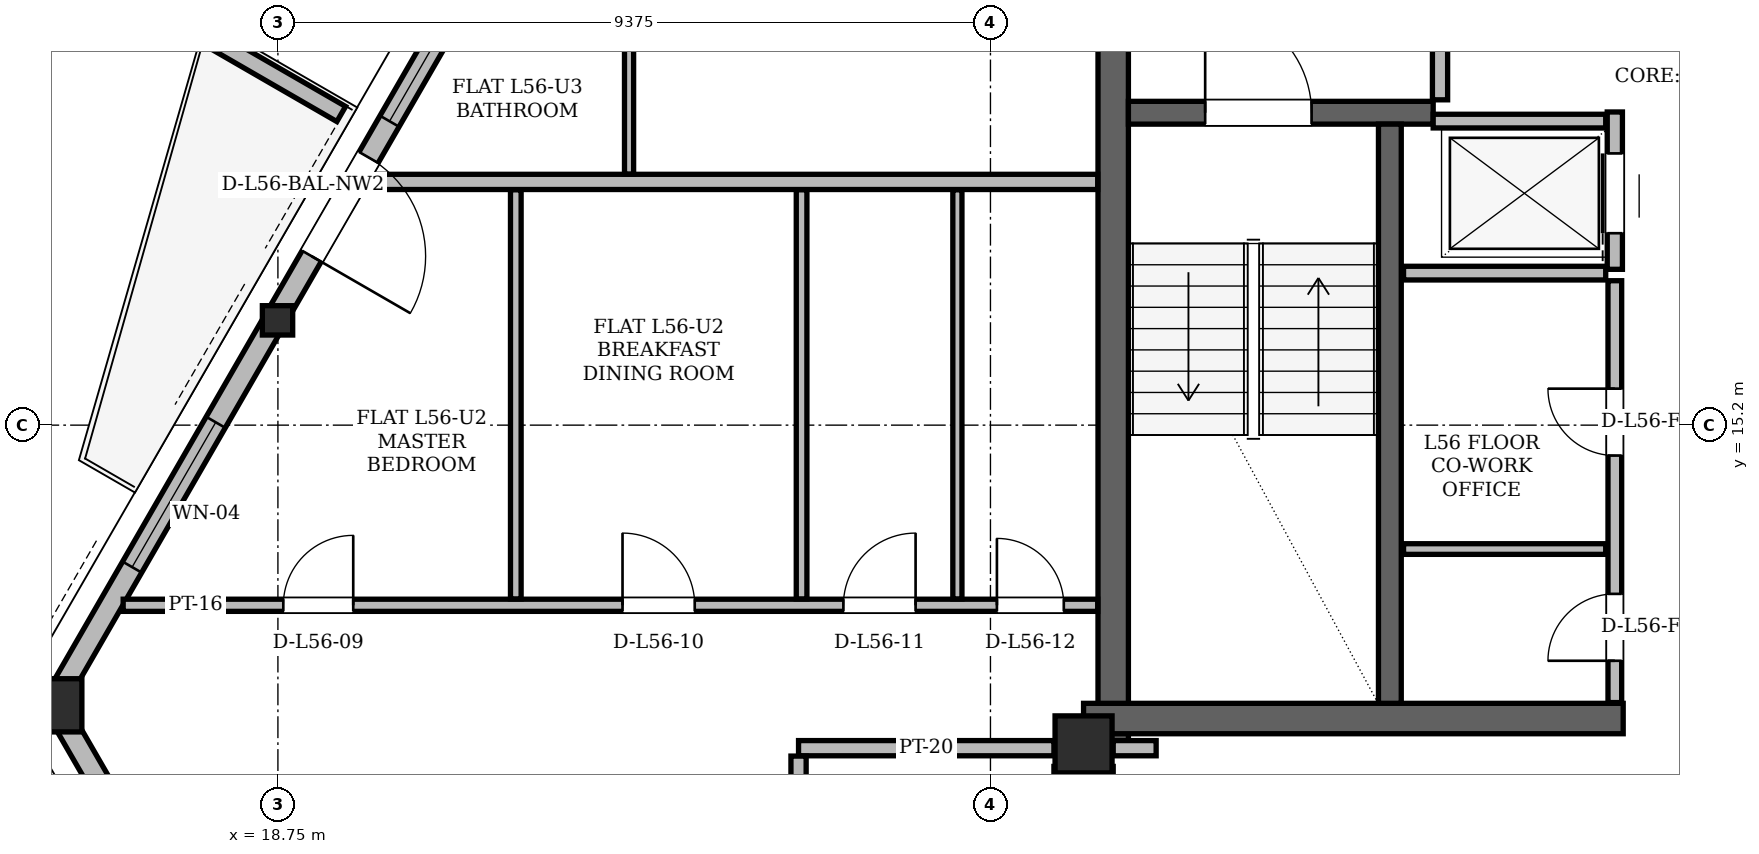
"""IFC4 building model, lengths in metres.
Left out: names, types, materials, properties, quantities, classifications, styles, units other than length and angle.
Written with IfcOpenShell. Run it as: python <this file> out.ifc"""

import sys

from ifc_helpers import new_model, si_unit, direction, frame, frame_2d, origin, origin_2d, place, context, subcontext, project, spatial, polyline, rectangle, hollow_rectangle, i_section, outline, extrude, element, fill, save


model = new_model("IFC4")
c1 = context("Model", 3, precision=1e-05, world=origin(), true_north=direction((0.0, 1.0)))
c2 = subcontext(c1, "Body", "Model", "MODEL_VIEW")
j1 = project(units=[si_unit("LENGTHUNIT", "METRE"), si_unit("PLANEANGLEUNIT", "RADIAN")], contexts=[c1])
p1 = place(None, origin())
s1 = spatial("IfcSite", under=j1, at=p1, CompositionType="ELEMENT")
p2 = place(p1, origin())
s2 = spatial("IfcBuilding", under=s1, at=p2, CompositionType="ELEMENT")
p3 = place(p2, frame((0.0, 0.0, 212.7)))
s3 = spatial("IfcBuildingStorey", under=s2, at=p3, CompositionType="ELEMENT", Elevation=212.7)
p4 = place(p3, frame((29.35, 11.0, 0.0), z_axis=(0.0, 0.0, 1.0), x_axis=(1.0, 0.0, 0.0)))
e1 = element("IfcColumn", 1, at=p4, inside=s3, PredefinedType="COLUMN", context=c2, shape_type="SweptSolid", body=[
    extrude(hollow_rectangle(XDim=0.75, YDim=0.75, WallThickness=0.06, at=origin_2d()), origin(), (0.0, 0.0, 1.0), 3.6),
])
p5 = place(p3, frame((15.799, 11.543, 0.005), z_axis=(0.012235746513, -0.016042423206, 0.999796442865), x_axis=(0.795122252878, 0.606449175924, 0.0)))
e2 = element("IfcColumn", 2, at=p5, inside=s3, PredefinedType="COLUMN", context=c2, shape_type="SweptSolid", body=[
    extrude(hollow_rectangle(XDim=0.7, YDim=0.7, WallThickness=0.055, at=origin_2d()), origin(), (0.0, 0.0, 1.0), 3.592),
])
p6 = place(p3, frame((18.721, 16.604, 0.005), z_axis=(0.013459547427, -0.013867412501, 0.999813250289), x_axis=(0.717580691628, 0.696475377169, 0.0)))
e3 = element("IfcColumn", 3, at=p6, inside=s3, PredefinedType="COLUMN", context=c2, shape_type="SweptSolid", body=[
    extrude(i_section(OverallWidth=0.399, OverallDepth=0.386, WebThickness=0.021, FlangeThickness=0.033, at=origin_2d()), origin(), (0.0, 0.0, 1.0), 3.592),
])
p7 = place(p3, frame((29.74, 11.0, 0.0), z_axis=(0.0, 0.0, 1.0), x_axis=(0.0, 1.0, 0.0)))
e4 = element("IfcWall", 4, at=p7, inside=s3, PredefinedType="SHEAR", context=c2, shape_type="SweptSolid", body=[
    extrude(rectangle(XDim=13.3, YDim=0.4, at=frame_2d((6.65, 0.0))), origin(), (0.0, 0.0, 1.0), 3.38),
])
p8 = place(p3, frame((29.35, 11.34, 0.0), z_axis=(0.0, 0.0, 1.0), x_axis=(1.0, 0.0, 0.0)))
e5 = element("IfcWall", 5, at=p8, inside=s3, PredefinedType="SHEAR", context=c2, shape_type="SweptSolid", body=[
    extrude(rectangle(XDim=7.1, YDim=0.4, at=frame_2d((3.55, 0.0))), origin(), (0.0, 0.0, 1.0), 3.38),
])
p9 = place(p3, frame((29.94, 19.31, 0.0), z_axis=(0.0, 0.0, 1.0), x_axis=(1.0, 0.0, 0.0)))
e6 = element("IfcWall", 6, at=p9, inside=s3, PredefinedType="SHEAR", context=c2, shape_type="SweptSolid", body=[
    extrude(rectangle(XDim=4.01, YDim=0.3, at=frame_2d((2.005, 0.0))), origin(), (0.0, 0.0, 1.0), 3.38),
])
p10 = place(p9, frame((1.01, 0.0, 0.0)))
e7 = element("IfcOpeningElement", 7, at=p10, cuts=e6, PredefinedType="OPENING", context=c2, shape_type="SweptSolid", body=[
    extrude(rectangle(XDim=1.4, YDim=2.2, at=frame_2d((0.7, 1.1))), frame((0.0, 0.15, 0.0), z_axis=(0.0, -1.0, 0.0), x_axis=(1.0, 0.0, 0.0)), (0.0, 0.0, 1.0), 0.3),
])
p11 = place(p3, frame((33.38, 11.54, 0.0), z_axis=(0.0, 0.0, 1.0), x_axis=(0.0, 1.0, 0.0)))
e8 = element("IfcWall", 8, at=p11, inside=s3, PredefinedType="SHEAR", context=c2, shape_type="SweptSolid", body=[
    extrude(rectangle(XDim=7.62, YDim=0.3, at=frame_2d((3.81, 0.0))), origin(), (0.0, 0.0, 1.0), 3.38),
])
p12 = place(p3, frame((15.799, 11.543, 0.0), z_axis=(0.0, 0.0, 1.0), x_axis=(0.499982540895, -0.866035483569, 0.0)))
e9 = element("IfcWall", 9, at=p12, inside=s3, PredefinedType="SOLIDWALL", context=c2, shape_type="SweptSolid", body=[
    extrude(rectangle(XDim=6.88, YDim=0.29, at=frame_2d((3.44, 0.0))), origin(), (0.0, 0.0, 1.0), 2.677),
])
p13 = place(p3, frame((34.06, 43.173, 0.0), z_axis=(0.0, 0.0, 1.0), x_axis=(-0.499999040053, -0.866025958009, 0.0)))
e10 = element("IfcWall", 10, at=p13, inside=s3, PredefinedType="SOLIDWALL", context=c2, shape_type="SweptSolid", body=[
    extrude(rectangle(XDim=36.523, YDim=0.29, at=frame_2d((18.261, 0.0))), origin(), (0.0, 0.0, 1.0), 2.677),
])
p14 = place(p13, frame((8.034, 0.0, 0.0)))
e11 = element("IfcOpeningElement", 11, at=p14, cuts=e10, PredefinedType="OPENING", context=c2, shape_type="SweptSolid", body=[
    extrude(rectangle(XDim=1.5, YDim=2.2, at=frame_2d((0.75, 1.1))), frame((0.0, 0.145, 0.0), z_axis=(0.0, -1.0, 0.0), x_axis=(1.0, 0.0, 0.0)), (0.0, 0.0, 1.0), 0.29),
])
p15 = place(p13, frame((28.233, 0.0, 0.0)))
e12 = element("IfcOpeningElement", 12, at=p15, cuts=e10, PredefinedType="OPENING", context=c2, shape_type="SweptSolid", body=[
    extrude(rectangle(XDim=1.5, YDim=2.2, at=frame_2d((0.75, 1.1))), frame((0.0, 0.145, 0.0), z_axis=(0.0, -1.0, 0.0), x_axis=(1.0, 0.0, 0.0)), (0.0, 0.0, 1.0), 0.29),
])
p16 = place(p13, frame((32.257, 0.0, 0.85)))
e13 = element("IfcOpeningElement", 13, at=p16, cuts=e10, PredefinedType="OPENING", context=c2, shape_type="SweptSolid", body=[
    extrude(rectangle(XDim=2.2, YDim=1.717, at=frame_2d((1.1, 0.858))), frame((0.0, 0.145, 0.0), z_axis=(0.0, -1.0, 0.0), x_axis=(1.0, 0.0, 0.0)), (0.0, 0.0, 1.0), 0.29),
])
p17 = place(p13, frame((22.716, 0.0, 0.85)))
e14 = element("IfcOpeningElement", 14, at=p17, cuts=e10, PredefinedType="OPENING", context=c2, shape_type="SweptSolid", body=[
    extrude(rectangle(XDim=1.2, YDim=1.48, at=frame_2d((0.6, 0.74))), frame((0.0, 0.145, 0.0), z_axis=(0.0, -1.0, 0.0), x_axis=(1.0, 0.0, 0.0)), (0.0, 0.0, 1.0), 0.29),
])
p18 = place(p13, frame((26.483, 0.0, 0.85)))
e15 = element("IfcOpeningElement", 15, at=p18, cuts=e10, PredefinedType="OPENING", context=c2, shape_type="SweptSolid", body=[
    extrude(rectangle(XDim=1.2, YDim=1.48, at=frame_2d((0.6, 0.74))), frame((0.0, 0.145, 0.0), z_axis=(0.0, -1.0, 0.0), x_axis=(1.0, 0.0, 0.0)), (0.0, 0.0, 1.0), 0.29),
])
p19 = place(p3, frame((19.583, 19.293, 0.0), z_axis=(0.0, 0.0, 1.0), x_axis=(-0.866012356593, 0.500022597718, 0.0)))
e16 = element("IfcWall", 16, at=p19, inside=s3, PredefinedType="PARAPET", context=c2, shape_type="SweptSolid", body=[
    extrude(outline(polyline([(0.0, 0.0), (2.042, 0.0), (2.042, 1.1), (0.0, 1.32), (0.0, 0.0)])), frame((0.0, 0.115, 0.0), z_axis=(0.0, -1.0, 0.0), x_axis=(1.0, 0.0, 0.0)), (0.0, 0.0, 1.0), 0.23),
])
p20 = place(p3, frame((34.04, 19.48, 0.0), z_axis=(0.0, 0.0, 1.0), x_axis=(0.0, 1.0, 0.0)))
e17 = element("IfcWall", 17, at=p20, inside=s3, PredefinedType="PARTITIONING", context=c2, shape_type="SweptSolid", body=[
    extrude(rectangle(XDim=4.5, YDim=0.2, at=frame_2d((2.25, 0.0))), origin(), (0.0, 0.0, 1.0), 3.38),
])
p21 = place(p20, frame((2.12, 0.0, 0.0)))
e18 = element("IfcOpeningElement", 18, at=p21, cuts=e17, PredefinedType="OPENING", context=c2, shape_type="SweptSolid", body=[
    extrude(rectangle(XDim=1.1, YDim=2.2, at=frame_2d((0.55, 1.1))), frame((0.0, 0.1, 0.0), z_axis=(0.0, -1.0, 0.0), x_axis=(1.0, 0.0, 0.0)), (0.0, 0.0, 1.0), 0.2),
])
p22 = place(p3, frame((36.34, 17.25, 0.0), z_axis=(0.0, 0.0, 1.0), x_axis=(0.0, 1.0, 0.0)))
e19 = element("IfcWall", 19, at=p22, inside=s3, PredefinedType="PARTITIONING", context=c2, shape_type="SweptSolid", body=[
    extrude(rectangle(XDim=2.07, YDim=0.2, at=frame_2d((1.035, 0.0))), origin(), (0.0, 0.0, 1.0), 3.38),
])
p23 = place(p22, frame((0.475, 0.0, 0.0)))
e20 = element("IfcOpeningElement", 20, at=p23, cuts=e19, PredefinedType="OPENING", context=c2, shape_type="SweptSolid", body=[
    extrude(rectangle(XDim=1.05, YDim=2.15, at=frame_2d((0.525, 1.075))), frame((0.0, 0.1, 0.0), z_axis=(0.0, -1.0, 0.0), x_axis=(1.0, 0.0, 0.0)), (0.0, 0.0, 1.0), 0.2),
])
p24 = place(p3, frame((33.95, 19.2, 0.0), z_axis=(0.0, 0.0, 1.0), x_axis=(1.0, 0.0, 0.0)))
e21 = element("IfcWall", 21, at=p24, inside=s3, PredefinedType="PARTITIONING", context=c2, shape_type="SweptSolid", body=[
    extrude(rectangle(XDim=2.27, YDim=0.18, at=frame_2d((1.135, 0.0))), origin(), (0.0, 0.0, 1.0), 3.38),
])
p25 = place(p3, frame((33.56, 17.2, 0.0), z_axis=(0.0, 0.0, 1.0), x_axis=(1.0, 0.0, 0.0)))
e22 = element("IfcWall", 22, at=p25, inside=s3, PredefinedType="PARTITIONING", context=c2, shape_type="SweptSolid", body=[
    extrude(rectangle(XDim=2.66, YDim=0.18, at=frame_2d((1.33, 0.0))), origin(), (0.0, 0.0, 1.0), 3.38),
])
p26 = place(p3, frame((36.34, 11.55, 0.0), z_axis=(0.0, 0.0, 1.0), x_axis=(0.0, 1.0, 0.0)))
e23 = element("IfcWall", 23, at=p26, inside=s3, PredefinedType="PARTITIONING", context=c2, shape_type="SweptSolid", body=[
    extrude(rectangle(XDim=5.55, YDim=0.18, at=frame_2d((2.775, 0.0))), origin(), (0.0, 0.0, 1.0), 3.38),
])
p27 = place(p26, frame((0.55, 0.0, 0.0)))
e24 = element("IfcOpeningElement", 24, at=p27, cuts=e23, PredefinedType="OPENING", context=c2, shape_type="SweptSolid", body=[
    extrude(rectangle(XDim=0.88, YDim=2.08, at=frame_2d((0.44, 1.04))), frame((0.0, 0.09, 0.0), z_axis=(0.0, -1.0, 0.0), x_axis=(1.0, 0.0, 0.0)), (0.0, 0.0, 1.0), 0.18),
])
p28 = place(p26, frame((3.25, 0.0, 0.0)))
e25 = element("IfcOpeningElement", 25, at=p28, cuts=e23, PredefinedType="OPENING", context=c2, shape_type="SweptSolid", body=[
    extrude(rectangle(XDim=0.88, YDim=2.08, at=frame_2d((0.44, 1.04))), frame((0.0, 0.09, 0.0), z_axis=(0.0, -1.0, 0.0), x_axis=(1.0, 0.0, 0.0)), (0.0, 0.0, 1.0), 0.18),
])
p29 = place(p3, frame((33.56, 13.57, 0.0), z_axis=(0.0, 0.0, 1.0), x_axis=(1.0, 0.0, 0.0)))
e26 = element("IfcWall", 26, at=p29, inside=s3, PredefinedType="PARTITIONING", context=c2, shape_type="SweptSolid", body=[
    extrude(rectangle(XDim=2.66, YDim=0.14, at=frame_2d((1.33, 0.0))), origin(), (0.0, 0.0, 1.0), 3.38),
])
p30 = place(p3, frame((28.96, 10.61, 0.0), z_axis=(0.0, 0.0, 1.0), x_axis=(1.0, 0.0, 0.0)))
e27 = element("IfcWall", 27, at=p30, inside=s3, PredefinedType="PARTITIONING", context=c2, shape_type="SweptSolid", body=[
    extrude(rectangle(XDim=0.78, YDim=0.2, at=frame_2d((0.39, 0.0))), origin(), (0.0, 0.0, 1.0), 3.38),
])
p31 = place(p3, frame((25.6, 10.95, 0.0), z_axis=(0.0, 0.0, 1.0), x_axis=(1.0, 0.0, 0.0)))
e28 = element("IfcWall", 28, at=p31, inside=s3, PredefinedType="PARTITIONING", context=c2, shape_type="SweptSolid", body=[
    extrude(rectangle(XDim=3.36, YDim=0.2, at=frame_2d((1.68, 0.0))), origin(), (0.0, 0.0, 1.0), 2.913),
])
p32 = place(p3, frame((29.74, 10.95, 0.0), z_axis=(0.0, 0.0, 1.0), x_axis=(1.0, 0.0, 0.0)))
e29 = element("IfcWall", 29, at=p32, inside=s3, PredefinedType="PARTITIONING", context=c2, shape_type="SweptSolid", body=[
    extrude(rectangle(XDim=0.565, YDim=0.2, at=frame_2d((0.282, 0.0))), origin(), (0.0, 0.0, 1.0), 2.52),
])
p33 = place(p3, frame((16.714, 12.83, 0.0), z_axis=(0.0, 0.0, 1.0), x_axis=(1.0, 0.0, 0.0)))
e30 = element("IfcWall", 30, at=p33, inside=s3, PredefinedType="PARTITIONING", context=c2, shape_type="SweptSolid", body=[
    extrude(rectangle(XDim=12.822, YDim=0.16, at=frame_2d((6.411, 0.0))), origin(), (0.0, 0.0, 1.0), 2.52),
])
p34 = place(p33, frame((2.107, 0.0, 0.0)))
e31 = element("IfcOpeningElement", 31, at=p34, cuts=e30, PredefinedType="OPENING", context=c2, shape_type="SweptSolid", body=[
    extrude(rectangle(XDim=0.92, YDim=2.12, at=frame_2d((0.46, 1.06))), frame((0.0, 0.08, 0.0), z_axis=(0.0, -1.0, 0.0), x_axis=(1.0, 0.0, 0.0)), (0.0, 0.0, 1.0), 0.16),
])
p35 = place(p33, frame((6.57, 0.0, 0.0)))
e32 = element("IfcOpeningElement", 32, at=p35, cuts=e30, PredefinedType="OPENING", context=c2, shape_type="SweptSolid", body=[
    extrude(rectangle(XDim=0.95, YDim=2.1, at=frame_2d((0.475, 1.05))), frame((0.0, 0.08, 0.0), z_axis=(0.0, -1.0, 0.0), x_axis=(1.0, 0.0, 0.0)), (0.0, 0.0, 1.0), 0.16),
])
p36 = place(p33, frame((9.476, 0.0, 0.0)))
e33 = element("IfcOpeningElement", 33, at=p36, cuts=e30, PredefinedType="OPENING", context=c2, shape_type="SweptSolid", body=[
    extrude(rectangle(XDim=0.95, YDim=2.1, at=frame_2d((0.475, 1.05))), frame((0.0, 0.08, 0.0), z_axis=(0.0, -1.0, 0.0), x_axis=(1.0, 0.0, 0.0)), (0.0, 0.0, 1.0), 0.16),
])
p37 = place(p33, frame((11.496, 0.0, 0.0)))
e34 = element("IfcOpeningElement", 34, at=p37, cuts=e30, PredefinedType="OPENING", context=c2, shape_type="SweptSolid", body=[
    extrude(rectangle(XDim=0.88, YDim=2.08, at=frame_2d((0.44, 1.04))), frame((0.0, 0.08, 0.0), z_axis=(0.0, -1.0, 0.0), x_axis=(1.0, 0.0, 0.0)), (0.0, 0.0, 1.0), 0.16),
])
p38 = place(p3, frame((19.93, 18.4, 0.0), z_axis=(0.0, 0.0, 1.0), x_axis=(1.0, 0.0, 0.0)))
e35 = element("IfcWall", 35, at=p38, inside=s3, PredefinedType="PARTITIONING", context=c2, shape_type="SweptSolid", body=[
    extrude(rectangle(XDim=9.606, YDim=0.2, at=frame_2d((4.803, 0.0))), origin(), (0.0, 0.0, 1.0), 2.52),
])
p39 = place(p3, frame((21.88, 12.914, 0.0), z_axis=(0.0, 0.0, 1.0), x_axis=(0.0, 1.0, 0.0)))
e36 = element("IfcWall", 36, at=p39, inside=s3, PredefinedType="PARTITIONING", context=c2, shape_type="SweptSolid", body=[
    extrude(rectangle(XDim=5.382, YDim=0.14, at=frame_2d((2.691, 0.0))), origin(), (0.0, 0.0, 1.0), 3.38),
])
p40 = place(p3, frame((23.37, 18.504, 0.0), z_axis=(0.0, 0.0, 1.0), x_axis=(0.0, 1.0, 0.0)))
e37 = element("IfcWall", 37, at=p40, inside=s3, PredefinedType="PARTITIONING", context=c2, shape_type="SweptSolid", body=[
    extrude(rectangle(XDim=5.712, YDim=0.12, at=frame_2d((2.856, 0.0))), origin(), (0.0, 0.0, 1.0), 3.38),
])
p41 = place(p40, frame((2.416, 0.0, 0.0)))
e38 = element("IfcOpeningElement", 38, at=p41, cuts=e37, PredefinedType="OPENING", context=c2, shape_type="SweptSolid", body=[
    extrude(rectangle(XDim=0.88, YDim=2.08, at=frame_2d((0.44, 1.04))), frame((0.0, 0.06, 0.0), z_axis=(0.0, -1.0, 0.0), x_axis=(1.0, 0.0, 0.0)), (0.0, 0.0, 1.0), 0.12),
])
p42 = place(p3, frame((25.6, 9.404, 0.0), z_axis=(0.0, 0.0, 1.0), x_axis=(0.0, 1.0, 0.0)))
e39 = element("IfcWall", 39, at=p42, inside=s3, PredefinedType="PARTITIONING", context=c2, shape_type="SweptSolid", body=[
    extrude(rectangle(XDim=1.442, YDim=0.2, at=frame_2d((0.721, 0.0))), origin(), (0.0, 0.0, 1.0), 3.38),
])
p43 = place(p3, frame((25.64, 12.914, 0.0), z_axis=(0.0, 0.0, 1.0), x_axis=(0.0, 1.0, 0.0)))
e40 = element("IfcWall", 40, at=p43, inside=s3, PredefinedType="PARTITIONING", context=c2, shape_type="SweptSolid", body=[
    extrude(rectangle(XDim=5.382, YDim=0.14, at=frame_2d((2.691, 0.0))), origin(), (0.0, 0.0, 1.0), 3.38),
])
p44 = place(p3, frame((27.69, 12.914, 0.0), z_axis=(0.0, 0.0, 1.0), x_axis=(0.0, 1.0, 0.0)))
e41 = element("IfcWall", 41, at=p44, inside=s3, PredefinedType="PARTITIONING", context=c2, shape_type="SweptSolid", body=[
    extrude(rectangle(XDim=5.382, YDim=0.12, at=frame_2d((2.691, 0.0))), origin(), (0.0, 0.0, 1.0), 3.38),
])
p45 = place(p15, origin())
e42 = element("IfcDoor", 42, at=p45, inside=s3, OperationType="SINGLE_SWING_RIGHT", PredefinedType="DOOR", context=c2, shape_type="SweptSolid", body=[
    extrude(rectangle(XDim=1.5, YDim=2.2, at=frame_2d((0.75, 1.1))), frame((0.0, 0.025, 0.0), z_axis=(0.0, -1.0, 0.0), x_axis=(1.0, 0.0, 0.0)), (0.0, 0.0, 1.0), 0.05),
])
fill(e12, e42)
p46 = place(p16, origin())
e43 = element("IfcWindow", 43, at=p46, inside=s3, PartitioningType="SINGLE_PANEL", PredefinedType="WINDOW", context=c2, shape_type="SweptSolid", body=[
    extrude(rectangle(XDim=2.2, YDim=1.717, at=frame_2d((1.1, 0.858))), frame((0.0, 0.03, 0.0), z_axis=(0.0, -1.0, 0.0), x_axis=(1.0, 0.0, 0.0)), (0.0, 0.0, 1.0), 0.06),
])
fill(e13, e43)
p47 = place(p18, origin())
e44 = element("IfcWindow", 44, at=p47, inside=s3, PartitioningType="SINGLE_PANEL", PredefinedType="WINDOW", context=c2, shape_type="SweptSolid", body=[
    extrude(rectangle(XDim=1.2, YDim=1.48, at=frame_2d((0.6, 0.74))), frame((0.0, 0.03, 0.0), z_axis=(0.0, -1.0, 0.0), x_axis=(1.0, 0.0, 0.0)), (0.0, 0.0, 1.0), 0.06),
])
fill(e15, e44)
p48 = place(p27, origin())
e45 = element("IfcDoor", 45, at=p48, inside=s3, OperationType="SINGLE_SWING_LEFT", PredefinedType="DOOR", context=c2, shape_type="SweptSolid", body=[
    extrude(rectangle(XDim=0.88, YDim=2.08, at=frame_2d((0.44, 1.04))), frame((0.0, 0.025, 0.0), z_axis=(0.0, -1.0, 0.0), x_axis=(1.0, 0.0, 0.0)), (0.0, 0.0, 1.0), 0.05),
])
fill(e24, e45)
p49 = place(p28, origin())
e46 = element("IfcDoor", 46, at=p49, inside=s3, OperationType="SINGLE_SWING_RIGHT", PredefinedType="DOOR", context=c2, shape_type="SweptSolid", body=[
    extrude(rectangle(XDim=0.88, YDim=2.08, at=frame_2d((0.44, 1.04))), frame((0.0, 0.025, 0.0), z_axis=(0.0, -1.0, 0.0), x_axis=(1.0, 0.0, 0.0)), (0.0, 0.0, 1.0), 0.05),
])
fill(e25, e46)
p50 = place(p23, origin())
e47 = element("IfcDoor", 47, at=p50, inside=s3, OperationType="SLIDING_TO_LEFT", PredefinedType="DOOR", context=c2, shape_type="SweptSolid", body=[
    extrude(rectangle(XDim=1.05, YDim=2.15, at=frame_2d((0.525, 1.075))), frame((0.0, 0.025, 0.0), z_axis=(0.0, -1.0, 0.0), x_axis=(1.0, 0.0, 0.0)), (0.0, 0.0, 1.0), 0.05),
])
fill(e20, e47)
p51 = place(p10, origin())
e48 = element("IfcDoor", 48, at=p51, inside=s3, OperationType="SINGLE_SWING_LEFT", PredefinedType="DOOR", context=c2, shape_type="SweptSolid", body=[
    extrude(rectangle(XDim=1.4, YDim=2.2, at=frame_2d((0.7, 1.1))), frame((0.0, 0.025, 0.0), z_axis=(0.0, -1.0, 0.0), x_axis=(1.0, 0.0, 0.0)), (0.0, 0.0, 1.0), 0.05),
])
fill(e7, e48)
p52 = place(p34, origin())
e49 = element("IfcDoor", 49, at=p52, inside=s3, OperationType="SINGLE_SWING_RIGHT", PredefinedType="DOOR", context=c2, shape_type="SweptSolid", body=[
    extrude(rectangle(XDim=0.92, YDim=2.12, at=frame_2d((0.46, 1.06))), frame((0.0, 0.025, 0.0), z_axis=(0.0, -1.0, 0.0), x_axis=(1.0, 0.0, 0.0)), (0.0, 0.0, 1.0), 0.05),
])
fill(e31, e49)
p53 = place(p35, origin())
e50 = element("IfcDoor", 50, at=p53, inside=s3, OperationType="SINGLE_SWING_LEFT", PredefinedType="DOOR", context=c2, shape_type="SweptSolid", body=[
    extrude(rectangle(XDim=0.95, YDim=2.1, at=frame_2d((0.475, 1.05))), frame((0.0, 0.025, 0.0), z_axis=(0.0, -1.0, 0.0), x_axis=(1.0, 0.0, 0.0)), (0.0, 0.0, 1.0), 0.05),
])
fill(e32, e50)
p54 = place(p36, origin())
e51 = element("IfcDoor", 51, at=p54, inside=s3, OperationType="SINGLE_SWING_RIGHT", PredefinedType="DOOR", context=c2, shape_type="SweptSolid", body=[
    extrude(rectangle(XDim=0.95, YDim=2.1, at=frame_2d((0.475, 1.05))), frame((0.0, 0.025, 0.0), z_axis=(0.0, -1.0, 0.0), x_axis=(1.0, 0.0, 0.0)), (0.0, 0.0, 1.0), 0.05),
])
fill(e33, e51)
p55 = place(p37, origin())
e52 = element("IfcDoor", 52, at=p55, inside=s3, OperationType="SINGLE_SWING_LEFT", PredefinedType="DOOR", context=c2, shape_type="SweptSolid", body=[
    extrude(rectangle(XDim=0.88, YDim=2.08, at=frame_2d((0.44, 1.04))), frame((0.0, 0.025, 0.0), z_axis=(0.0, -1.0, 0.0), x_axis=(1.0, 0.0, 0.0)), (0.0, 0.0, 1.0), 0.05),
])
fill(e34, e52)
save(model, sys.argv[1])
